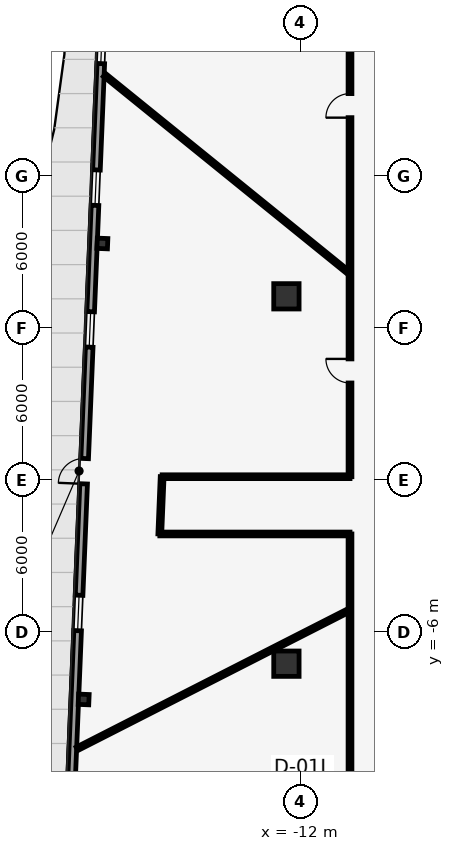
"""IFC4 building model, lengths in metres.
Left out: names, types, materials, properties, quantities, classifications, styles, units other than length and angle.
Written with IfcOpenShell. Run it as: python <this file> out.ifc"""

import sys

from ifc_helpers import new_model, si_unit, direction, frame, frame_2d, origin, origin_2d, place, context, subcontext, project, spatial, rectangle, i_section, extrude, element, fill, save


model = new_model("IFC4")
c1 = context("Model", 3, precision=1e-05, world=origin(), true_north=direction((0.0, 1.0)))
c2 = subcontext(c1, "Body", "Model", "MODEL_VIEW")
j1 = project(units=[si_unit("LENGTHUNIT", "METRE"), si_unit("PLANEANGLEUNIT", "RADIAN")], contexts=[c1])
p1 = place(None, origin())
s1 = spatial("IfcSite", under=j1, at=p1, CompositionType="ELEMENT")
p2 = place(p1, origin())
s2 = spatial("IfcBuilding", under=s1, at=p2, CompositionType="ELEMENT")
p3 = place(p2, frame((0.0, 0.0, 181.9)))
s3 = spatial("IfcBuildingStorey", under=s2, at=p3, CompositionType="ELEMENT", Elevation=181.9)
for number, where, z_axis, x_axis in (
    (1, (-12.56, -7.25, 0.0), (0.0, 0.0, 1.0), (1.0, 0.0, 0.0)),
    (2, (-12.56, 7.25, 0.0), (0.0, 0.0, 1.0), (1.0, 0.0, 0.0)),
):
    element("IfcColumn", number, at=place(p3, frame(where, z_axis=z_axis, x_axis=x_axis)), inside=s3, PredefinedType="COLUMN", context=c2, shape_type="SweptSolid", body=[
        extrude(rectangle(XDim=1.0, YDim=1.0, at=origin_2d()), origin(), (0.0, 0.0, 1.0), 4.1),
    ])
for number, where, z_axis, x_axis in (
    (3, (-19.824, 9.335, 0.0), (0.0, 0.0, 1.0), (0.041, 0.999, 0.0)),
    (4, (-20.562, -8.661, 0.0), (0.0, 0.0, 1.0), (0.041, 0.999, 0.0)),
):
    element("IfcColumn", number, at=place(p3, frame(where, z_axis=z_axis, x_axis=x_axis)), inside=s3, PredefinedType="COLUMN", context=c2, shape_type="SweptSolid", body=[
        extrude(i_section(OverallWidth=0.406, OverallDepth=0.417, WebThickness=0.03, FlangeThickness=0.048, at=origin_2d()), origin(), (0.0, 0.0, 1.0), 4.1),
    ])
p4 = place(p3, frame((-12.255, 31.689, 0.0), z_axis=(0.0, 0.0, 1.0), x_axis=(0.851166647402, -0.524895549944, 0.0)))
e5 = element("IfcWall", 5, at=p4, inside=s3, PredefinedType="STANDARD", context=c2, shape_type="SweptSolid", body=[
    extrude(rectangle(XDim=55.111, YDim=0.3, at=frame_2d((27.555, 0.0))), origin(), (0.0, 0.0, 1.0), 3.85),
])
p5 = place(p4, frame((27.055, 0.0, 0.0)))
e6 = element("IfcOpeningElement", 6, at=p5, cuts=e5, PredefinedType="OPENING", context=c2, shape_type="SweptSolid", body=[
    extrude(rectangle(XDim=1.0, YDim=2.15, at=frame_2d((0.5, 1.075))), frame((0.0, 0.16, 0.0), z_axis=(0.0, -1.0, 0.0), x_axis=(1.0, 0.0, 0.0)), (0.0, 0.0, 1.0), 0.32),
])
p6 = place(p4, frame((4.455, 0.0, 0.85)))
e7 = element("IfcOpeningElement", 7, at=p6, cuts=e5, PredefinedType="OPENING", context=c2, shape_type="SweptSolid", body=[
    extrude(rectangle(XDim=1.4, YDim=2.2, at=frame_2d((0.7, 1.1))), frame((0.0, 0.16, 0.0), z_axis=(0.0, -1.0, 0.0), x_axis=(1.0, 0.0, 0.0)), (0.0, 0.0, 1.0), 0.32),
])
p7 = place(p4, frame((10.055, 0.0, 0.85)))
e8 = element("IfcOpeningElement", 8, at=p7, cuts=e5, PredefinedType="OPENING", context=c2, shape_type="SweptSolid", body=[
    extrude(rectangle(XDim=1.4, YDim=2.2, at=frame_2d((0.7, 1.1))), frame((0.0, 0.16, 0.0), z_axis=(0.0, -1.0, 0.0), x_axis=(1.0, 0.0, 0.0)), (0.0, 0.0, 1.0), 0.32),
])
p8 = place(p4, frame((15.655, 0.0, 0.85)))
e9 = element("IfcOpeningElement", 9, at=p8, cuts=e5, PredefinedType="OPENING", context=c2, shape_type="SweptSolid", body=[
    extrude(rectangle(XDim=1.4, YDim=2.2, at=frame_2d((0.7, 1.1))), frame((0.0, 0.16, 0.0), z_axis=(0.0, -1.0, 0.0), x_axis=(1.0, 0.0, 0.0)), (0.0, 0.0, 1.0), 0.32),
])
p9 = place(p4, frame((21.255, 0.0, 0.85)))
e10 = element("IfcOpeningElement", 10, at=p9, cuts=e5, PredefinedType="OPENING", context=c2, shape_type="SweptSolid", body=[
    extrude(rectangle(XDim=1.4, YDim=2.2, at=frame_2d((0.7, 1.1))), frame((0.0, 0.16, 0.0), z_axis=(0.0, -1.0, 0.0), x_axis=(1.0, 0.0, 0.0)), (0.0, 0.0, 1.0), 0.32),
])
p10 = place(p4, frame((32.455, 0.0, 0.85)))
e11 = element("IfcOpeningElement", 11, at=p10, cuts=e5, PredefinedType="OPENING", context=c2, shape_type="SweptSolid", body=[
    extrude(rectangle(XDim=1.4, YDim=2.2, at=frame_2d((0.7, 1.1))), frame((0.0, 0.16, 0.0), z_axis=(0.0, -1.0, 0.0), x_axis=(1.0, 0.0, 0.0)), (0.0, 0.0, 1.0), 0.32),
])
p11 = place(p4, frame((38.055, 0.0, 0.85)))
e12 = element("IfcOpeningElement", 12, at=p11, cuts=e5, PredefinedType="OPENING", context=c2, shape_type="SweptSolid", body=[
    extrude(rectangle(XDim=1.4, YDim=2.2, at=frame_2d((0.7, 1.1))), frame((0.0, 0.16, 0.0), z_axis=(0.0, -1.0, 0.0), x_axis=(1.0, 0.0, 0.0)), (0.0, 0.0, 1.0), 0.32),
])
p12 = place(p4, frame((43.655, 0.0, 0.85)))
e13 = element("IfcOpeningElement", 13, at=p12, cuts=e5, PredefinedType="OPENING", context=c2, shape_type="SweptSolid", body=[
    extrude(rectangle(XDim=1.4, YDim=2.2, at=frame_2d((0.7, 1.1))), frame((0.0, 0.16, 0.0), z_axis=(0.0, -1.0, 0.0), x_axis=(1.0, 0.0, 0.0)), (0.0, 0.0, 1.0), 0.32),
])
p13 = place(p4, frame((49.255, 0.0, 0.85)))
e14 = element("IfcOpeningElement", 14, at=p13, cuts=e5, PredefinedType="OPENING", context=c2, shape_type="SweptSolid", body=[
    extrude(rectangle(XDim=1.4, YDim=2.2, at=frame_2d((0.7, 1.1))), frame((0.0, 0.16, 0.0), z_axis=(0.0, -1.0, 0.0), x_axis=(1.0, 0.0, 0.0)), (0.0, 0.0, 1.0), 0.32),
])
p14 = place(p3, frame((34.398, -5.217, 0.0), z_axis=(0.0, 0.0, 1.0), x_axis=(-0.88294811928, -0.469470572731, 0.0)))
e15 = element("IfcWall", 15, at=p14, inside=s3, PredefinedType="STANDARD", context=c2, shape_type="SweptSolid", body=[
    extrude(rectangle(XDim=55.845, YDim=0.3, at=frame_2d((27.923, 0.0))), origin(), (0.0, 0.0, 1.0), 3.85),
])
p15 = place(p14, frame((27.423, 0.0, 0.0)))
e16 = element("IfcOpeningElement", 16, at=p15, cuts=e15, PredefinedType="OPENING", context=c2, shape_type="SweptSolid", body=[
    extrude(rectangle(XDim=1.0, YDim=2.15, at=frame_2d((0.5, 1.075))), frame((0.0, 0.16, 0.0), z_axis=(0.0, -1.0, 0.0), x_axis=(1.0, 0.0, 0.0)), (0.0, 0.0, 1.0), 0.32),
])
p16 = place(p14, frame((4.823, 0.0, 0.85)))
e17 = element("IfcOpeningElement", 17, at=p16, cuts=e15, PredefinedType="OPENING", context=c2, shape_type="SweptSolid", body=[
    extrude(rectangle(XDim=1.4, YDim=2.2, at=frame_2d((0.7, 1.1))), frame((0.0, 0.16, 0.0), z_axis=(0.0, -1.0, 0.0), x_axis=(1.0, 0.0, 0.0)), (0.0, 0.0, 1.0), 0.32),
])
p17 = place(p14, frame((10.423, 0.0, 0.85)))
e18 = element("IfcOpeningElement", 18, at=p17, cuts=e15, PredefinedType="OPENING", context=c2, shape_type="SweptSolid", body=[
    extrude(rectangle(XDim=1.4, YDim=2.2, at=frame_2d((0.7, 1.1))), frame((0.0, 0.16, 0.0), z_axis=(0.0, -1.0, 0.0), x_axis=(1.0, 0.0, 0.0)), (0.0, 0.0, 1.0), 0.32),
])
p18 = place(p14, frame((21.623, 0.0, 0.85)))
e19 = element("IfcOpeningElement", 19, at=p18, cuts=e15, PredefinedType="OPENING", context=c2, shape_type="SweptSolid", body=[
    extrude(rectangle(XDim=1.4, YDim=2.2, at=frame_2d((0.7, 1.1))), frame((0.0, 0.16, 0.0), z_axis=(0.0, -1.0, 0.0), x_axis=(1.0, 0.0, 0.0)), (0.0, 0.0, 1.0), 0.32),
])
p19 = place(p14, frame((32.823, 0.0, 0.85)))
e20 = element("IfcOpeningElement", 20, at=p19, cuts=e15, PredefinedType="OPENING", context=c2, shape_type="SweptSolid", body=[
    extrude(rectangle(XDim=1.4, YDim=2.2, at=frame_2d((0.7, 1.1))), frame((0.0, 0.16, 0.0), z_axis=(0.0, -1.0, 0.0), x_axis=(1.0, 0.0, 0.0)), (0.0, 0.0, 1.0), 0.32),
])
p20 = place(p14, frame((38.423, 0.0, 0.85)))
e21 = element("IfcOpeningElement", 21, at=p20, cuts=e15, PredefinedType="OPENING", context=c2, shape_type="SweptSolid", body=[
    extrude(rectangle(XDim=1.4, YDim=2.2, at=frame_2d((0.7, 1.1))), frame((0.0, 0.16, 0.0), z_axis=(0.0, -1.0, 0.0), x_axis=(1.0, 0.0, 0.0)), (0.0, 0.0, 1.0), 0.32),
])
p21 = place(p14, frame((44.023, 0.0, 0.85)))
e22 = element("IfcOpeningElement", 22, at=p21, cuts=e15, PredefinedType="OPENING", context=c2, shape_type="SweptSolid", body=[
    extrude(rectangle(XDim=1.4, YDim=2.2, at=frame_2d((0.7, 1.1))), frame((0.0, 0.16, 0.0), z_axis=(0.0, -1.0, 0.0), x_axis=(1.0, 0.0, 0.0)), (0.0, 0.0, 1.0), 0.32),
])
p22 = place(p14, frame((49.623, 0.0, 0.85)))
e23 = element("IfcOpeningElement", 23, at=p22, cuts=e15, PredefinedType="OPENING", context=c2, shape_type="SweptSolid", body=[
    extrude(rectangle(XDim=1.4, YDim=2.2, at=frame_2d((0.7, 1.1))), frame((0.0, 0.16, 0.0), z_axis=(0.0, -1.0, 0.0), x_axis=(1.0, 0.0, 0.0)), (0.0, 0.0, 1.0), 0.32),
])
p23 = place(p3, frame((-21.667, -27.184, 0.0), z_axis=(0.0, 0.0, 1.0), x_axis=(0.040813869681, 0.999166766882, 0.0)))
e24 = element("IfcWall", 24, at=p23, inside=s3, PredefinedType="STANDARD", context=c2, shape_type="SweptSolid", body=[
    extrude(rectangle(XDim=55.11, YDim=0.3, at=frame_2d((27.555, 0.0))), origin(), (0.0, 0.0, 1.0), 3.85),
])
p24 = place(p23, frame((27.055, 0.0, 0.0)))
e25 = element("IfcOpeningElement", 25, at=p24, cuts=e24, PredefinedType="OPENING", context=c2, shape_type="SweptSolid", body=[
    extrude(rectangle(XDim=1.0, YDim=2.15, at=frame_2d((0.5, 1.075))), frame((0.0, 0.16, 0.0), z_axis=(0.0, -1.0, 0.0), x_axis=(1.0, 0.0, 0.0)), (0.0, 0.0, 1.0), 0.32),
])
p25 = place(p23, frame((4.455, 0.0, 0.85)))
e26 = element("IfcOpeningElement", 26, at=p25, cuts=e24, PredefinedType="OPENING", context=c2, shape_type="SweptSolid", body=[
    extrude(rectangle(XDim=1.4, YDim=2.2, at=frame_2d((0.7, 1.1))), frame((0.0, 0.16, 0.0), z_axis=(0.0, -1.0, 0.0), x_axis=(1.0, 0.0, 0.0)), (0.0, 0.0, 1.0), 0.32),
])
p26 = place(p23, frame((10.055, 0.0, 0.85)))
e27 = element("IfcOpeningElement", 27, at=p26, cuts=e24, PredefinedType="OPENING", context=c2, shape_type="SweptSolid", body=[
    extrude(rectangle(XDim=1.4, YDim=2.2, at=frame_2d((0.7, 1.1))), frame((0.0, 0.16, 0.0), z_axis=(0.0, -1.0, 0.0), x_axis=(1.0, 0.0, 0.0)), (0.0, 0.0, 1.0), 0.32),
])
p27 = place(p23, frame((21.255, 0.0, 0.85)))
e28 = element("IfcOpeningElement", 28, at=p27, cuts=e24, PredefinedType="OPENING", context=c2, shape_type="SweptSolid", body=[
    extrude(rectangle(XDim=1.4, YDim=2.2, at=frame_2d((0.7, 1.1))), frame((0.0, 0.16, 0.0), z_axis=(0.0, -1.0, 0.0), x_axis=(1.0, 0.0, 0.0)), (0.0, 0.0, 1.0), 0.32),
])
p28 = place(p23, frame((32.455, 0.0, 0.85)))
e29 = element("IfcOpeningElement", 29, at=p28, cuts=e24, PredefinedType="OPENING", context=c2, shape_type="SweptSolid", body=[
    extrude(rectangle(XDim=1.4, YDim=2.2, at=frame_2d((0.7, 1.1))), frame((0.0, 0.16, 0.0), z_axis=(0.0, -1.0, 0.0), x_axis=(1.0, 0.0, 0.0)), (0.0, 0.0, 1.0), 0.32),
])
p29 = place(p23, frame((38.055, 0.0, 0.85)))
e30 = element("IfcOpeningElement", 30, at=p29, cuts=e24, PredefinedType="OPENING", context=c2, shape_type="SweptSolid", body=[
    extrude(rectangle(XDim=1.4, YDim=2.2, at=frame_2d((0.7, 1.1))), frame((0.0, 0.16, 0.0), z_axis=(0.0, -1.0, 0.0), x_axis=(1.0, 0.0, 0.0)), (0.0, 0.0, 1.0), 0.32),
])
p30 = place(p23, frame((43.655, 0.0, 0.85)))
e31 = element("IfcOpeningElement", 31, at=p30, cuts=e24, PredefinedType="OPENING", context=c2, shape_type="SweptSolid", body=[
    extrude(rectangle(XDim=1.4, YDim=2.2, at=frame_2d((0.7, 1.1))), frame((0.0, 0.16, 0.0), z_axis=(0.0, -1.0, 0.0), x_axis=(1.0, 0.0, 0.0)), (0.0, 0.0, 1.0), 0.32),
])
p31 = place(p23, frame((49.255, 0.0, 0.85)))
e32 = element("IfcOpeningElement", 32, at=p31, cuts=e24, PredefinedType="OPENING", context=c2, shape_type="SweptSolid", body=[
    extrude(rectangle(XDim=1.4, YDim=2.2, at=frame_2d((0.7, 1.1))), frame((0.0, 0.16, 0.0), z_axis=(0.0, -1.0, 0.0), x_axis=(1.0, 0.0, 0.0)), (0.0, 0.0, 1.0), 0.32),
])
p32 = place(p3, frame((-10.05, -21.58, 0.0), z_axis=(0.0, 0.0, 1.0), x_axis=(0.0, 1.0, 0.0)))
e33 = element("IfcWall", 33, at=p32, inside=s3, PredefinedType="PARTITIONING", context=c2, shape_type="SweptSolid", body=[
    extrude(rectangle(XDim=19.45, YDim=0.15, at=frame_2d((9.725, 0.0))), origin(), (0.0, 0.0, 1.0), 3.85),
])
p33 = place(p32, frame((7.857, 0.0, 0.0)))
e34 = element("IfcOpeningElement", 34, at=p33, cuts=e33, PredefinedType="OPENING", context=c2, shape_type="SweptSolid", body=[
    extrude(rectangle(XDim=0.95, YDim=2.15, at=frame_2d((0.475, 1.075))), frame((0.0, 0.085, 0.0), z_axis=(0.0, -1.0, 0.0), x_axis=(1.0, 0.0, 0.0)), (0.0, 0.0, 1.0), 0.17),
])
p34 = place(p3, frame((-10.05, -2.13, 0.0), z_axis=(0.0, 0.0, 1.0), x_axis=(-1.0, 0.0, 0.0)))
e35 = element("IfcWall", 35, at=p34, inside=s3, PredefinedType="PARTITIONING", context=c2, shape_type="SweptSolid", body=[
    extrude(rectangle(XDim=7.506, YDim=0.15, at=frame_2d((3.753, 0.0))), origin(), (0.0, 0.0, 1.0), 3.85),
])
p35 = place(p3, frame((-17.556, -2.13, 0.0), z_axis=(0.0, 0.0, 1.0), x_axis=(0.040804363078, 0.999167155162, 0.0)))
e36 = element("IfcWall", 36, at=p35, inside=s3, PredefinedType="PARTITIONING", context=c2, shape_type="SweptSolid", body=[
    extrude(rectangle(XDim=2.262, YDim=0.15, at=frame_2d((1.131, 0.0))), origin(), (0.0, 0.0, 1.0), 3.85),
])
p36 = place(p3, frame((-17.464, 0.13, 0.0), z_axis=(0.0, 0.0, 1.0), x_axis=(1.0, 0.0, 0.0)))
e37 = element("IfcWall", 37, at=p36, inside=s3, PredefinedType="PARTITIONING", context=c2, shape_type="SweptSolid", body=[
    extrude(rectangle(XDim=7.414, YDim=0.15, at=frame_2d((3.707, 0.0))), origin(), (0.0, 0.0, 1.0), 3.85),
])
p37 = place(p3, frame((-10.05, 0.13, 0.0), z_axis=(0.0, 0.0, 1.0), x_axis=(0.0, 1.0, 0.0)))
e38 = element("IfcWall", 38, at=p37, inside=s3, PredefinedType="PARTITIONING", context=c2, shape_type="SweptSolid", body=[
    extrude(rectangle(XDim=21.45, YDim=0.15, at=frame_2d((10.725, 0.0))), origin(), (0.0, 0.0, 1.0), 3.85),
])
p38 = place(p37, frame((14.171, 0.0, 0.0)))
e39 = element("IfcOpeningElement", 39, at=p38, cuts=e38, PredefinedType="OPENING", context=c2, shape_type="SweptSolid", body=[
    extrude(rectangle(XDim=0.95, YDim=2.15, at=frame_2d((0.475, 1.075))), frame((0.0, 0.085, 0.0), z_axis=(0.0, -1.0, 0.0), x_axis=(1.0, 0.0, 0.0)), (0.0, 0.0, 1.0), 0.17),
])
p39 = place(p37, frame((3.699, 0.0, 0.0)))
e40 = element("IfcOpeningElement", 40, at=p39, cuts=e38, PredefinedType="OPENING", context=c2, shape_type="SweptSolid", body=[
    extrude(rectangle(XDim=0.95, YDim=2.15, at=frame_2d((0.475, 1.075))), frame((0.0, 0.085, 0.0), z_axis=(0.0, -1.0, 0.0), x_axis=(1.0, 0.0, 0.0)), (0.0, 0.0, 1.0), 0.17),
])
p40 = place(p3, frame((-10.155, 8.223, 0.0), z_axis=(0.0, 0.0, 1.0), x_axis=(-0.777144819035, 0.629321801821, 0.0)))
e41 = element("IfcWall", 41, at=p40, inside=s3, PredefinedType="PARTITIONING", context=c2, shape_type="SweptSolid", body=[
    extrude(rectangle(XDim=12.332, YDim=0.15, at=frame_2d((6.166, 0.0))), origin(), (0.0, 0.0, 1.0), 3.85),
])
p41 = place(p3, frame((-10.155, -5.174, 0.0), z_axis=(0.0, 0.0, 1.0), x_axis=(-0.891004955427, -0.453993578593, 0.0)))
e42 = element("IfcWall", 42, at=p41, inside=s3, PredefinedType="PARTITIONING", context=c2, shape_type="SweptSolid", body=[
    extrude(rectangle(XDim=11.975, YDim=0.15, at=frame_2d((5.988, 0.0))), origin(), (0.0, 0.0, 1.0), 3.85),
])
p42 = place(p24, origin())
e43 = element("IfcDoor", 43, at=p42, inside=s3, OperationType="SINGLE_SWING_LEFT", PredefinedType="DOOR", context=c2, shape_type="SweptSolid", body=[
    extrude(rectangle(XDim=1.0, YDim=2.15, at=frame_2d((0.5, 1.075))), frame((0.0, 0.025, 0.0), z_axis=(0.0, -1.0, 0.0), x_axis=(1.0, 0.0, 0.0)), (0.0, 0.0, 1.0), 0.05),
])
fill(e25, e43)
p43 = place(p27, origin())
e44 = element("IfcWindow", 44, at=p43, inside=s3, PartitioningType="SINGLE_PANEL", PredefinedType="WINDOW", context=c2, shape_type="SweptSolid", body=[
    extrude(rectangle(XDim=1.4, YDim=2.2, at=frame_2d((0.7, 1.1))), frame((0.0, 0.03, 0.0), z_axis=(0.0, -1.0, 0.0), x_axis=(1.0, 0.0, 0.0)), (0.0, 0.0, 1.0), 0.06),
])
fill(e28, e44)
p44 = place(p28, origin())
e45 = element("IfcWindow", 45, at=p44, inside=s3, PartitioningType="SINGLE_PANEL", PredefinedType="WINDOW", context=c2, shape_type="SweptSolid", body=[
    extrude(rectangle(XDim=1.4, YDim=2.2, at=frame_2d((0.7, 1.1))), frame((0.0, 0.03, 0.0), z_axis=(0.0, -1.0, 0.0), x_axis=(1.0, 0.0, 0.0)), (0.0, 0.0, 1.0), 0.06),
])
fill(e29, e45)
p45 = place(p29, origin())
e46 = element("IfcWindow", 46, at=p45, inside=s3, PartitioningType="SINGLE_PANEL", PredefinedType="WINDOW", context=c2, shape_type="SweptSolid", body=[
    extrude(rectangle(XDim=1.4, YDim=2.2, at=frame_2d((0.7, 1.1))), frame((0.0, 0.03, 0.0), z_axis=(0.0, -1.0, 0.0), x_axis=(1.0, 0.0, 0.0)), (0.0, 0.0, 1.0), 0.06),
])
fill(e30, e46)
p46 = place(p30, origin())
e47 = element("IfcWindow", 47, at=p46, inside=s3, PartitioningType="SINGLE_PANEL", PredefinedType="WINDOW", context=c2, shape_type="SweptSolid", body=[
    extrude(rectangle(XDim=1.4, YDim=2.2, at=frame_2d((0.7, 1.1))), frame((0.0, 0.03, 0.0), z_axis=(0.0, -1.0, 0.0), x_axis=(1.0, 0.0, 0.0)), (0.0, 0.0, 1.0), 0.06),
])
fill(e31, e47)
p47 = place(p38, origin())
e48 = element("IfcDoor", 48, at=p47, inside=s3, OperationType="SINGLE_SWING_LEFT", PredefinedType="DOOR", context=c2, shape_type="SweptSolid", body=[
    extrude(rectangle(XDim=0.95, YDim=2.15, at=frame_2d((0.475, 1.075))), frame((0.0, 0.025, 0.0), z_axis=(0.0, -1.0, 0.0), x_axis=(1.0, 0.0, 0.0)), (0.0, 0.0, 1.0), 0.05),
])
fill(e39, e48)
p48 = place(p39, origin())
e49 = element("IfcDoor", 49, at=p48, inside=s3, OperationType="SINGLE_SWING_RIGHT", PredefinedType="DOOR", context=c2, shape_type="SweptSolid", body=[
    extrude(rectangle(XDim=0.95, YDim=2.15, at=frame_2d((0.475, 1.075))), frame((0.0, 0.025, 0.0), z_axis=(0.0, -1.0, 0.0), x_axis=(1.0, 0.0, 0.0)), (0.0, 0.0, 1.0), 0.05),
])
fill(e40, e49)
save(model, sys.argv[1])
